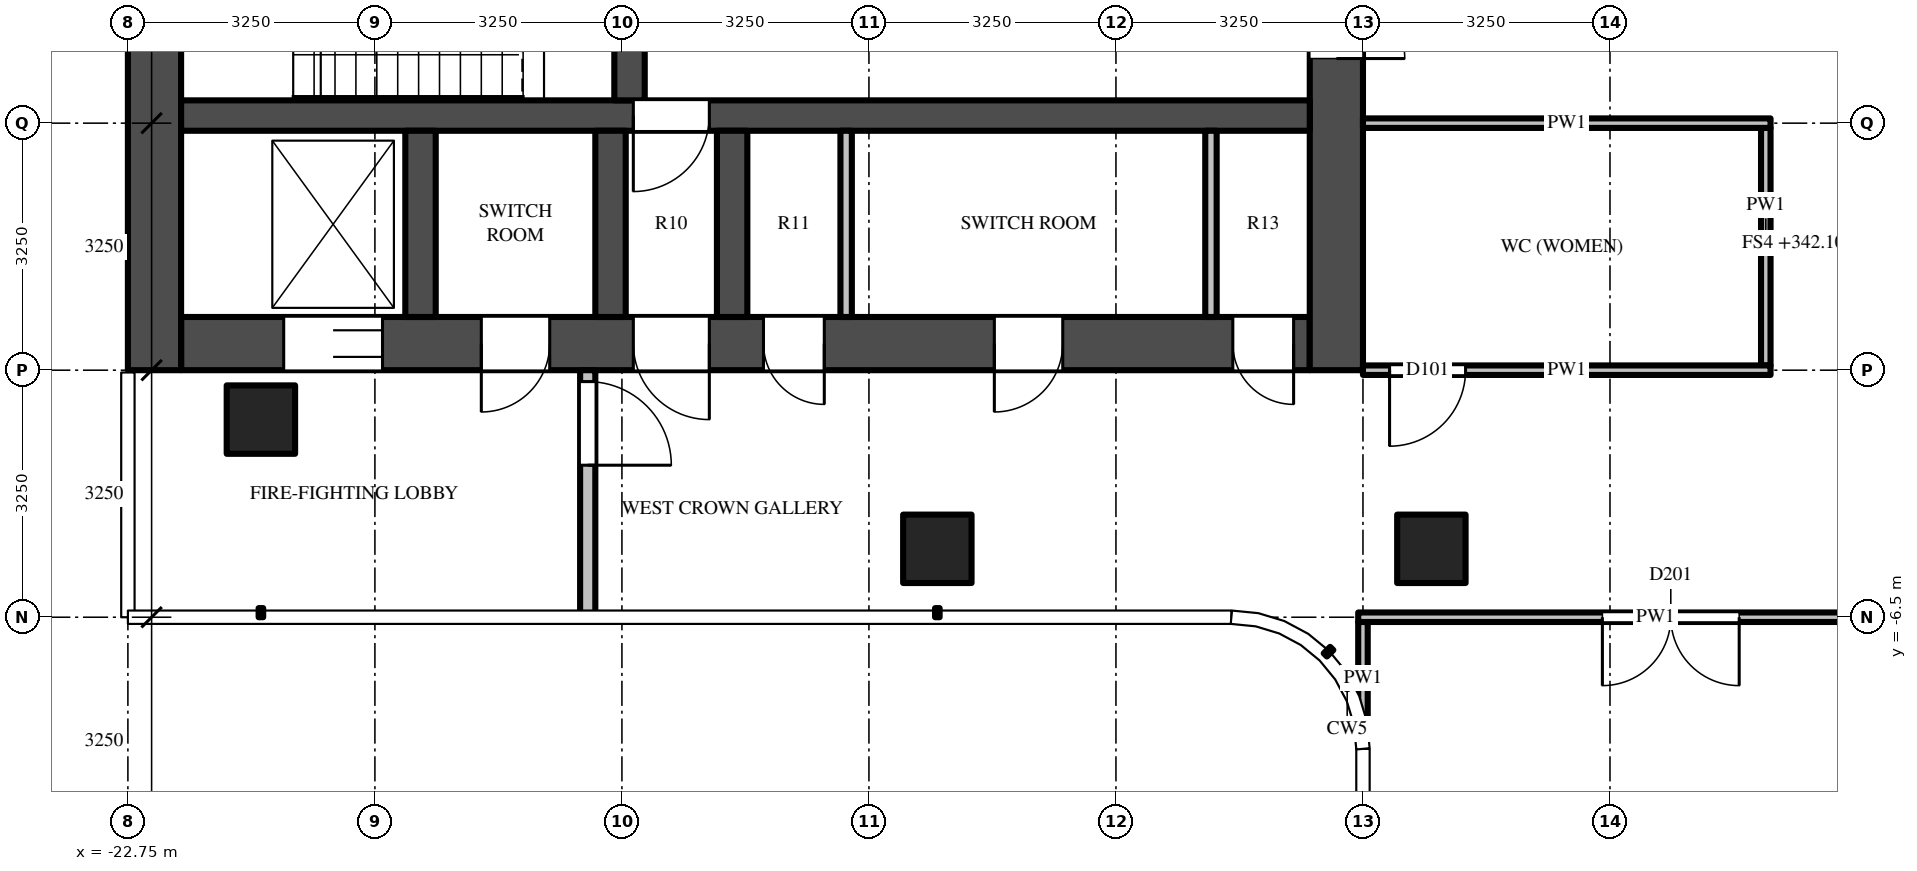
"""IFC4 building model, lengths in metres.
Left out: names, types, materials, properties, quantities, classifications, styles, units other than length and angle.
Written with IfcOpenShell. Run it as: python <this file> out.ifc"""

import sys

from ifc_helpers import new_model, si_unit, direction, frame, frame_2d, origin, origin_2d, place, context, subcontext, project, spatial, rectangle, extrude, source, transform, mapped, element, fill, save


model = new_model("IFC4")
c1 = context("Model", 3, precision=1e-05, world=origin(), true_north=direction((0.0, 1.0)))
c2 = subcontext(c1, "Body", "Model", "MODEL_VIEW")
j1 = project(units=[si_unit("LENGTHUNIT", "METRE"), si_unit("PLANEANGLEUNIT", "RADIAN")], contexts=[c1])
p1 = place(None, origin())
s1 = spatial("IfcSite", under=j1, at=p1, CompositionType="ELEMENT")
p2 = place(p1, origin())
s2 = spatial("IfcBuilding", under=s1, at=p2, CompositionType="ELEMENT")
p3 = place(p2, frame((0.0, 0.0, 342.1)))
s3 = spatial("IfcBuildingStorey", under=s2, at=p3, CompositionType="ELEMENT", Elevation=342.1)
m1 = source(origin(), c2, "Body", "SweptSolid", [
    extrude(rectangle(XDim=0.9, YDim=0.9, at=origin_2d()), origin(), (0.0, 0.0, 1.0), 4.0),
])
for number, where, z_axis, x_axis in (
    (1, (-5.6, -5.6, 0.0), (0.0, 0.0, 1.0), (1.0, 0.0, 0.0)),
    (2, (-12.1, -5.6, 0.0), (0.0, 0.0, 1.0), (1.0, 0.0, 0.0)),
    (3, (-21.0, -3.9, 0.0), (0.0, 0.0, 1.0), (1.0, 0.0, 0.0)),
):
    element("IfcColumn", number, at=place(p3, frame(where, z_axis=z_axis, x_axis=x_axis)), inside=s3, PredefinedType="COLUMN", context=c2, shape_type="MappedRepresentation", body=[
        mapped(m1, transform((0.0, 0.0, 0.0))),
    ])
m2 = source(origin(), c2, "Body", "SweptSolid", [
    extrude(rectangle(XDim=14.85, YDim=0.7, at=frame_2d((7.425, 0.0))), origin(), (0.0, 0.0, 1.0), 3.75),
])
p4 = place(p3, frame((-7.2, -2.9, 0.0), z_axis=(0.0, 0.0, 1.0), x_axis=(-1.0, 0.0, 0.0)))
e4 = element("IfcWall", 4, at=p4, inside=s3, PredefinedType="SHEAR", context=c2, shape_type="MappedRepresentation", body=[
    mapped(m2, transform((0.0, 0.0, 0.0))),
])
m3 = source(origin(), c2, "Body", "SweptSolid", [
    extrude(rectangle(XDim=1.3, YDim=2.1, at=frame_2d((0.65, 1.05))), frame((0.0, 0.36, 0.0), z_axis=(0.0, -1.0, 0.0), x_axis=(1.0, 0.0, 0.0)), (0.0, 0.0, 1.0), 0.72),
])
p5 = place(p4, frame((12.2, 0.0, 0.0)))
e5 = element("IfcOpeningElement", 5, at=p5, cuts=e4, PredefinedType="OPENING", context=c2, shape_type="MappedRepresentation", body=[
    mapped(m3, transform((0.0, 0.0, 0.0))),
])
m4 = source(origin(), c2, "Body", "SweptSolid", [
    extrude(rectangle(XDim=1.0, YDim=2.1, at=frame_2d((0.5, 1.05))), frame((0.0, 0.36, 0.0), z_axis=(0.0, -1.0, 0.0), x_axis=(1.0, 0.0, 0.0)), (0.0, 0.0, 1.0), 0.72),
])
p6 = place(p4, frame((7.9, 0.0, 0.0)))
e6 = element("IfcOpeningElement", 6, at=p6, cuts=e4, PredefinedType="OPENING", context=c2, shape_type="MappedRepresentation", body=[
    mapped(m4, transform((0.0, 0.0, 0.0))),
])
m5 = source(origin(), c2, "Body", "SweptSolid", [
    extrude(rectangle(XDim=0.8, YDim=2.1, at=frame_2d((0.4, 1.05))), frame((0.0, 0.36, 0.0), z_axis=(0.0, -1.0, 0.0), x_axis=(1.0, 0.0, 0.0)), (0.0, 0.0, 1.0), 0.72),
])
p7 = place(p4, frame((0.212, 0.0, 0.0)))
e7 = element("IfcOpeningElement", 7, at=p7, cuts=e4, PredefinedType="OPENING", context=c2, shape_type="MappedRepresentation", body=[
    mapped(m5, transform((0.0, 0.0, 0.0))),
])
m6 = source(origin(), c2, "Body", "SweptSolid", [
    extrude(rectangle(XDim=0.9, YDim=2.1, at=frame_2d((0.45, 1.05))), frame((0.0, 0.36, 0.0), z_axis=(0.0, -1.0, 0.0), x_axis=(1.0, 0.0, 0.0)), (0.0, 0.0, 1.0), 0.72),
])
p8 = place(p4, frame((3.25, 0.0, 0.0)))
e8 = element("IfcOpeningElement", 8, at=p8, cuts=e4, PredefinedType="OPENING", context=c2, shape_type="MappedRepresentation", body=[
    mapped(m6, transform((0.0, 0.0, 0.0))),
])
p9 = place(p4, frame((6.387, 0.0, 0.0)))
e9 = element("IfcOpeningElement", 9, at=p9, cuts=e4, PredefinedType="OPENING", context=c2, shape_type="MappedRepresentation", body=[
    mapped(m5, transform((0.0, 0.0, 0.0))),
])
p10 = place(p4, frame((10.0, 0.0, 0.0)))
e10 = element("IfcOpeningElement", 10, at=p10, cuts=e4, PredefinedType="OPENING", context=c2, shape_type="MappedRepresentation", body=[
    mapped(m6, transform((0.0, 0.0, 0.0))),
])
m7 = source(origin(), c2, "Body", "SweptSolid", [
    extrude(rectangle(XDim=9.05, YDim=0.7, at=frame_2d((4.525, 0.0))), origin(), (0.0, 0.0, 1.0), 3.75),
])
p11 = place(p3, frame((-6.85, 5.8, 0.0), z_axis=(0.0, 0.0, 1.0), x_axis=(0.0, -1.0, 0.0)))
e11 = element("IfcWall", 11, at=p11, inside=s3, PredefinedType="SHEAR", context=c2, shape_type="MappedRepresentation", body=[
    mapped(m7, transform((0.0, 0.0, 0.0))),
])
m8 = source(origin(), c2, "Body", "SweptSolid", [
    extrude(rectangle(XDim=1.8, YDim=2.1, at=frame_2d((0.9, 1.05))), frame((0.0, 0.36, 0.0), z_axis=(0.0, -1.0, 0.0), x_axis=(1.0, 0.0, 0.0)), (0.0, 0.0, 1.0), 0.72),
])
p12 = place(p11, frame((3.15, 0.0, 0.0)))
e12 = element("IfcOpeningElement", 12, at=p12, cuts=e11, PredefinedType="OPENING", context=c2, shape_type="MappedRepresentation", body=[
    mapped(m8, transform((0.0, 0.0, 0.0))),
])
p13 = place(p3, frame((-22.4, 5.8, 0.0), z_axis=(0.0, 0.0, 1.0), x_axis=(0.0, -1.0, 0.0)))
e13 = element("IfcWall", 13, at=p13, inside=s3, PredefinedType="SHEAR", context=c2, shape_type="MappedRepresentation", body=[
    mapped(m7, transform((0.0, 0.0, 0.0))),
])
m9 = source(origin(), c2, "Body", "SweptSolid", [
    extrude(rectangle(XDim=14.85, YDim=0.4, at=frame_2d((7.425, 0.0))), origin(), (0.0, 0.0, 1.0), 3.75),
])
p14 = place(p3, frame((-7.2, 0.1, 0.0), z_axis=(0.0, 0.0, 1.0), x_axis=(-1.0, 0.0, 0.0)))
e14 = element("IfcWall", 14, at=p14, inside=s3, PredefinedType="SHEAR", context=c2, shape_type="MappedRepresentation", body=[
    mapped(m9, transform((0.0, 0.0, 0.0))),
])
m10 = source(origin(), c2, "Body", "SweptSolid", [
    extrude(rectangle(XDim=1.0, YDim=2.1, at=frame_2d((0.5, 1.05))), frame((0.0, 0.21, 0.0), z_axis=(0.0, -1.0, 0.0), x_axis=(1.0, 0.0, 0.0)), (0.0, 0.0, 1.0), 0.42),
])
p15 = place(p14, frame((7.9, 0.0, 0.0)))
e15 = element("IfcOpeningElement", 15, at=p15, cuts=e14, PredefinedType="OPENING", context=c2, shape_type="MappedRepresentation", body=[
    mapped(m10, transform((0.0, 0.0, 0.0))),
])
m11 = source(origin(), c2, "Body", "SweptSolid", [
    extrude(rectangle(XDim=5.5, YDim=0.4, at=frame_2d((2.75, 0.0))), origin(), (0.0, 0.0, 1.0), 3.75),
])
p16 = place(p3, frame((-16.15, 5.8, 0.0), z_axis=(0.0, 0.0, 1.0), x_axis=(0.0, -1.0, 0.0)))
e16 = element("IfcWall", 16, at=p16, inside=s3, PredefinedType="SHEAR", context=c2, shape_type="MappedRepresentation", body=[
    mapped(m11, transform((0.0, 0.0, 0.0))),
])
m12 = source(origin(), c2, "Body", "SweptSolid", [
    extrude(rectangle(XDim=1.1, YDim=2.1, at=frame_2d((0.55, 1.05))), frame((0.0, 0.21, 0.0), z_axis=(0.0, -1.0, 0.0), x_axis=(1.0, 0.0, 0.0)), (0.0, 0.0, 1.0), 0.42),
])
p17 = place(p16, frame((0.725, 0.0, 0.0)))
e17 = element("IfcOpeningElement", 17, at=p17, cuts=e16, PredefinedType="OPENING", context=c2, shape_type="MappedRepresentation", body=[
    mapped(m12, transform((0.0, 0.0, 0.0))),
])
p18 = place(p16, frame((3.675, 0.0, 0.0)))
e18 = element("IfcOpeningElement", 18, at=p18, cuts=e16, PredefinedType="OPENING", context=c2, shape_type="MappedRepresentation", body=[
    mapped(m12, transform((0.0, 0.0, 0.0))),
])
m13 = source(origin(), c2, "Body", "SweptSolid", [
    extrude(rectangle(XDim=2.45, YDim=0.4, at=frame_2d((1.225, 0.0))), origin(), (0.0, 0.0, 1.0), 3.75),
])
for number, where, z_axis, x_axis in (
    (19, (-14.8, -0.1, 0.0), (0.0, 0.0, 1.0), (0.0, -1.0, 0.0)),
    (20, (-16.4, -0.1, 0.0), (0.0, 0.0, 1.0), (0.0, -1.0, 0.0)),
    (21, (-18.9, -0.1, 0.0), (0.0, 0.0, 1.0), (0.0, -1.0, 0.0)),
):
    element("IfcWall", number, at=place(p3, frame(where, z_axis=z_axis, x_axis=x_axis)), inside=s3, PredefinedType="SHEAR", context=c2, shape_type="MappedRepresentation", body=[
        mapped(m13, transform((0.0, 0.0, 0.0))),
    ])
m14 = source(origin(), c2, "Body", "SweptSolid", [
    extrude(rectangle(XDim=3.25, YDim=0.2, at=frame_2d((1.625, 0.0))), origin(), (0.0, 0.0, 1.0), 3.75),
])
p19 = place(p3, frame((-16.7, -3.25, 0.0), z_axis=(0.0, 0.0, 1.0), x_axis=(0.0, -1.0, 0.0)))
e22 = element("IfcWall", 22, at=p19, inside=s3, PredefinedType="PARTITIONING", context=c2, shape_type="MappedRepresentation", body=[
    mapped(m14, transform((0.0, 0.0, 0.0))),
])
m15 = source(origin(), c2, "Body", "SweptSolid", [
    extrude(rectangle(XDim=1.1, YDim=2.1, at=frame_2d((0.55, 1.05))), frame((0.0, 0.11, 0.0), z_axis=(0.0, -1.0, 0.0), x_axis=(1.0, 0.0, 0.0)), (0.0, 0.0, 1.0), 0.22),
])
p20 = place(p19, frame((0.15, 0.0, 0.0)))
e23 = element("IfcOpeningElement", 23, at=p20, cuts=e22, PredefinedType="OPENING", context=c2, shape_type="MappedRepresentation", body=[
    mapped(m15, transform((0.0, 0.0, 0.0))),
])
m16 = source(origin(), c2, "Body", "SweptSolid", [
    extrude(rectangle(XDim=2.45, YDim=0.15, at=frame_2d((1.225, 0.0))), origin(), (0.0, 0.0, 1.0), 3.75),
])
for number, where, z_axis, x_axis in (
    (24, (-8.5, -0.1, 0.0), (0.0, 0.0, 1.0), (0.0, -1.0, 0.0)),
    (25, (-13.3, -0.1, 0.0), (0.0, 0.0, 1.0), (0.0, -1.0, 0.0)),
):
    element("IfcWall", number, at=place(p3, frame(where, z_axis=z_axis, x_axis=x_axis)), inside=s3, PredefinedType="PARTITIONING", context=c2, shape_type="MappedRepresentation", body=[
        mapped(m16, transform((0.0, 0.0, 0.0))),
    ])
m17 = source(origin(), c2, "Body", "SweptSolid", [
    extrude(rectangle(XDim=1.469, YDim=0.125, at=frame_2d((0.734, 0.0))), origin(), (0.0, 0.0, 1.0), 3.75),
])
p21 = place(p3, frame((-6.5, -6.562, 0.0), z_axis=(0.0, 0.0, 1.0), x_axis=(0.0, -1.0, 0.0)))
e26 = element("IfcWall", 26, at=p21, inside=s3, PredefinedType="PARTITIONING", context=c2, shape_type="MappedRepresentation", body=[
    mapped(m17, transform((0.0, 0.0, 0.0))),
])
m18 = source(origin(), c2, "Body", "SweptSolid", [
    extrude(rectangle(XDim=3.125, YDim=0.125, at=frame_2d((1.562, 0.0))), origin(), (0.0, 0.0, 1.0), 3.118),
])
p22 = place(p3, frame((-1.2, -0.062, 0.0), z_axis=(0.0, 0.0, 1.0), x_axis=(0.0, -1.0, 0.0)))
e27 = element("IfcWall", 27, at=p22, inside=s3, PredefinedType="PARTITIONING", context=c2, shape_type="MappedRepresentation", body=[
    mapped(m18, transform((0.0, 0.0, 0.0))),
])
m19 = source(origin(), c2, "Body", "SweptSolid", [
    extrude(rectangle(XDim=7.825, YDim=0.125, at=frame_2d((3.913, 0.0))), origin(), (0.0, 0.0, 1.0), 2.83),
])
p23 = place(p3, frame((1.262, -6.5, 0.0), z_axis=(0.0, 0.0, 1.0), x_axis=(-1.0, 0.0, 0.0)))
e28 = element("IfcWall", 28, at=p23, inside=s3, PredefinedType="PARTITIONING", context=c2, shape_type="MappedRepresentation", body=[
    mapped(m19, transform((0.0, 0.0, 0.0))),
])
m20 = source(origin(), c2, "Body", "SweptSolid", [
    extrude(rectangle(XDim=1.8, YDim=2.1, at=frame_2d((0.9, 1.05))), frame((0.0, 0.073, 0.0), z_axis=(0.0, -1.0, 0.0), x_axis=(1.0, 0.0, 0.0)), (0.0, 0.0, 1.0), 0.145),
])
p24 = place(p23, frame((2.812, 0.0, 0.0)))
e29 = element("IfcOpeningElement", 29, at=p24, cuts=e28, PredefinedType="OPENING", context=c2, shape_type="MappedRepresentation", body=[
    mapped(m20, transform((0.0, 0.0, 0.0))),
])
m21 = source(origin(), c2, "Body", "SweptSolid", [
    extrude(rectangle(XDim=5.363, YDim=0.125, at=frame_2d((2.681, 0.0))), origin(), (0.0, 0.0, 1.0), 3.046),
])
p25 = place(p3, frame((-1.137, -3.25, 0.0), z_axis=(0.0, 0.0, 1.0), x_axis=(-1.0, 0.0, 0.0)))
e30 = element("IfcWall", 30, at=p25, inside=s3, PredefinedType="PARTITIONING", context=c2, shape_type="MappedRepresentation", body=[
    mapped(m21, transform((0.0, 0.0, 0.0))),
])
m22 = source(origin(), c2, "Body", "SweptSolid", [
    extrude(rectangle(XDim=1.0, YDim=2.1, at=frame_2d((0.5, 1.05))), frame((0.0, 0.073, 0.0), z_axis=(0.0, -1.0, 0.0), x_axis=(1.0, 0.0, 0.0)), (0.0, 0.0, 1.0), 0.145),
])
p26 = place(p25, frame((4.012, 0.0, 0.0)))
e31 = element("IfcOpeningElement", 31, at=p26, cuts=e30, PredefinedType="OPENING", context=c2, shape_type="MappedRepresentation", body=[
    mapped(m22, transform((0.0, 0.0, 0.0))),
])
p27 = place(p3, frame((-1.137, 0.0, 0.0), z_axis=(0.0, 0.0, 1.0), x_axis=(-1.0, 0.0, 0.0)))
e32 = element("IfcWall", 32, at=p27, inside=s3, PredefinedType="PARTITIONING", context=c2, shape_type="MappedRepresentation", body=[
    mapped(m21, transform((0.0, 0.0, 0.0))),
])
m23 = source(origin(), c2, "Body", "SweptSolid", [
    extrude(rectangle(XDim=1.3, YDim=2.1, at=frame_2d((0.65, 1.05))), frame((0.0, -0.275, 0.0), z_axis=(0.0, -1.0, 0.0), x_axis=(1.0, 0.0, 0.0)), (0.0, 0.0, 1.0), 0.05),
])
p28 = place(p5, origin())
e33 = element("IfcDoor", 33, at=p28, inside=s3, OperationType="DOUBLE_DOOR_SLIDING", PredefinedType="DOOR", context=c2, shape_type="MappedRepresentation", body=[
    mapped(m23, transform((0.0, 0.0, 0.0))),
])
fill(e5, e33)
m24 = source(origin(), c2, "Body", "SweptSolid", [
    extrude(rectangle(XDim=1.8, YDim=2.1, at=frame_2d((0.9, 1.05))), frame((0.0, -0.275, 0.0), z_axis=(0.0, -1.0, 0.0), x_axis=(1.0, 0.0, 0.0)), (0.0, 0.0, 1.0), 0.05),
])
p29 = place(p12, origin())
e34 = element("IfcDoor", 34, at=p29, inside=s3, OperationType="DOUBLE_DOOR_SINGLE_SWING", PredefinedType="DOOR", context=c2, shape_type="MappedRepresentation", body=[
    mapped(m24, transform((0.0, 0.0, 0.0))),
])
fill(e12, e34)
m25 = source(origin(), c2, "Body", "SweptSolid", [
    extrude(rectangle(XDim=1.0, YDim=2.1, at=frame_2d((0.5, 1.05))), frame((0.0, 0.025, 0.0), z_axis=(0.0, -1.0, 0.0), x_axis=(1.0, 0.0, 0.0)), (0.0, 0.0, 1.0), 0.05),
])
p30 = place(p15, origin())
e35 = element("IfcDoor", 35, at=p30, inside=s3, OperationType="SINGLE_SWING_RIGHT", PredefinedType="DOOR", context=c2, shape_type="MappedRepresentation", body=[
    mapped(m25, transform((0.0, 0.0, 0.0))),
])
fill(e15, e35)
m26 = source(origin(), c2, "Body", "SweptSolid", [
    extrude(rectangle(XDim=1.0, YDim=2.1, at=frame_2d((0.5, 1.05))), frame((0.0, -0.275, 0.0), z_axis=(0.0, -1.0, 0.0), x_axis=(1.0, 0.0, 0.0)), (0.0, 0.0, 1.0), 0.05),
])
p31 = place(p6, origin())
e36 = element("IfcDoor", 36, at=p31, inside=s3, OperationType="SINGLE_SWING_LEFT", PredefinedType="DOOR", context=c2, shape_type="MappedRepresentation", body=[
    mapped(m26, transform((0.0, 0.0, 0.0))),
])
fill(e6, e36)
m27 = source(origin(), c2, "Body", "SweptSolid", [
    extrude(rectangle(XDim=1.1, YDim=2.1, at=frame_2d((0.55, 1.05))), frame((0.0, 0.025, 0.0), z_axis=(0.0, -1.0, 0.0), x_axis=(1.0, 0.0, 0.0)), (0.0, 0.0, 1.0), 0.05),
])
p32 = place(p20, origin())
e37 = element("IfcDoor", 37, at=p32, inside=s3, OperationType="SINGLE_SWING_RIGHT", PredefinedType="DOOR", context=c2, shape_type="MappedRepresentation", body=[
    mapped(m27, transform((0.0, 0.0, 0.0))),
])
fill(e23, e37)
m28 = source(origin(), c2, "Body", "SweptSolid", [
    extrude(rectangle(XDim=0.8, YDim=2.1, at=frame_2d((0.4, 1.05))), frame((0.0, -0.275, 0.0), z_axis=(0.0, -1.0, 0.0), x_axis=(1.0, 0.0, 0.0)), (0.0, 0.0, 1.0), 0.05),
])
p33 = place(p7, origin())
e38 = element("IfcDoor", 38, at=p33, inside=s3, OperationType="SINGLE_SWING_LEFT", PredefinedType="DOOR", context=c2, shape_type="MappedRepresentation", body=[
    mapped(m28, transform((0.0, 0.0, 0.0))),
])
fill(e7, e38)
m29 = source(origin(), c2, "Body", "SweptSolid", [
    extrude(rectangle(XDim=0.9, YDim=2.1, at=frame_2d((0.45, 1.05))), frame((0.0, -0.275, 0.0), z_axis=(0.0, -1.0, 0.0), x_axis=(1.0, 0.0, 0.0)), (0.0, 0.0, 1.0), 0.05),
])
p34 = place(p8, origin())
e39 = element("IfcDoor", 39, at=p34, inside=s3, OperationType="SINGLE_SWING_RIGHT", PredefinedType="DOOR", context=c2, shape_type="MappedRepresentation", body=[
    mapped(m29, transform((0.0, 0.0, 0.0))),
])
fill(e8, e39)
p35 = place(p9, origin())
e40 = element("IfcDoor", 40, at=p35, inside=s3, OperationType="SINGLE_SWING_LEFT", PredefinedType="DOOR", context=c2, shape_type="MappedRepresentation", body=[
    mapped(m28, transform((0.0, 0.0, 0.0))),
])
fill(e9, e40)
p36 = place(p10, origin())
e41 = element("IfcDoor", 41, at=p36, inside=s3, OperationType="SINGLE_SWING_RIGHT", PredefinedType="DOOR", context=c2, shape_type="MappedRepresentation", body=[
    mapped(m29, transform((0.0, 0.0, 0.0))),
])
fill(e10, e41)
m30 = source(origin(), c2, "Body", "SweptSolid", [
    extrude(rectangle(XDim=1.8, YDim=2.1, at=frame_2d((0.9, 1.05))), frame((0.0, 0.025, 0.0), z_axis=(0.0, -1.0, 0.0), x_axis=(1.0, 0.0, 0.0)), (0.0, 0.0, 1.0), 0.05),
])
p37 = place(p24, origin())
e42 = element("IfcDoor", 42, at=p37, inside=s3, OperationType="DOUBLE_DOOR_SINGLE_SWING", PredefinedType="DOOR", context=c2, shape_type="MappedRepresentation", body=[
    mapped(m30, transform((0.0, 0.0, 0.0))),
])
fill(e29, e42)
p38 = place(p26, origin())
e43 = element("IfcDoor", 43, at=p38, inside=s3, OperationType="SINGLE_SWING_RIGHT", PredefinedType="DOOR", context=c2, shape_type="MappedRepresentation", body=[
    mapped(m25, transform((0.0, 0.0, 0.0))),
])
fill(e31, e43)
save(model, sys.argv[1])
